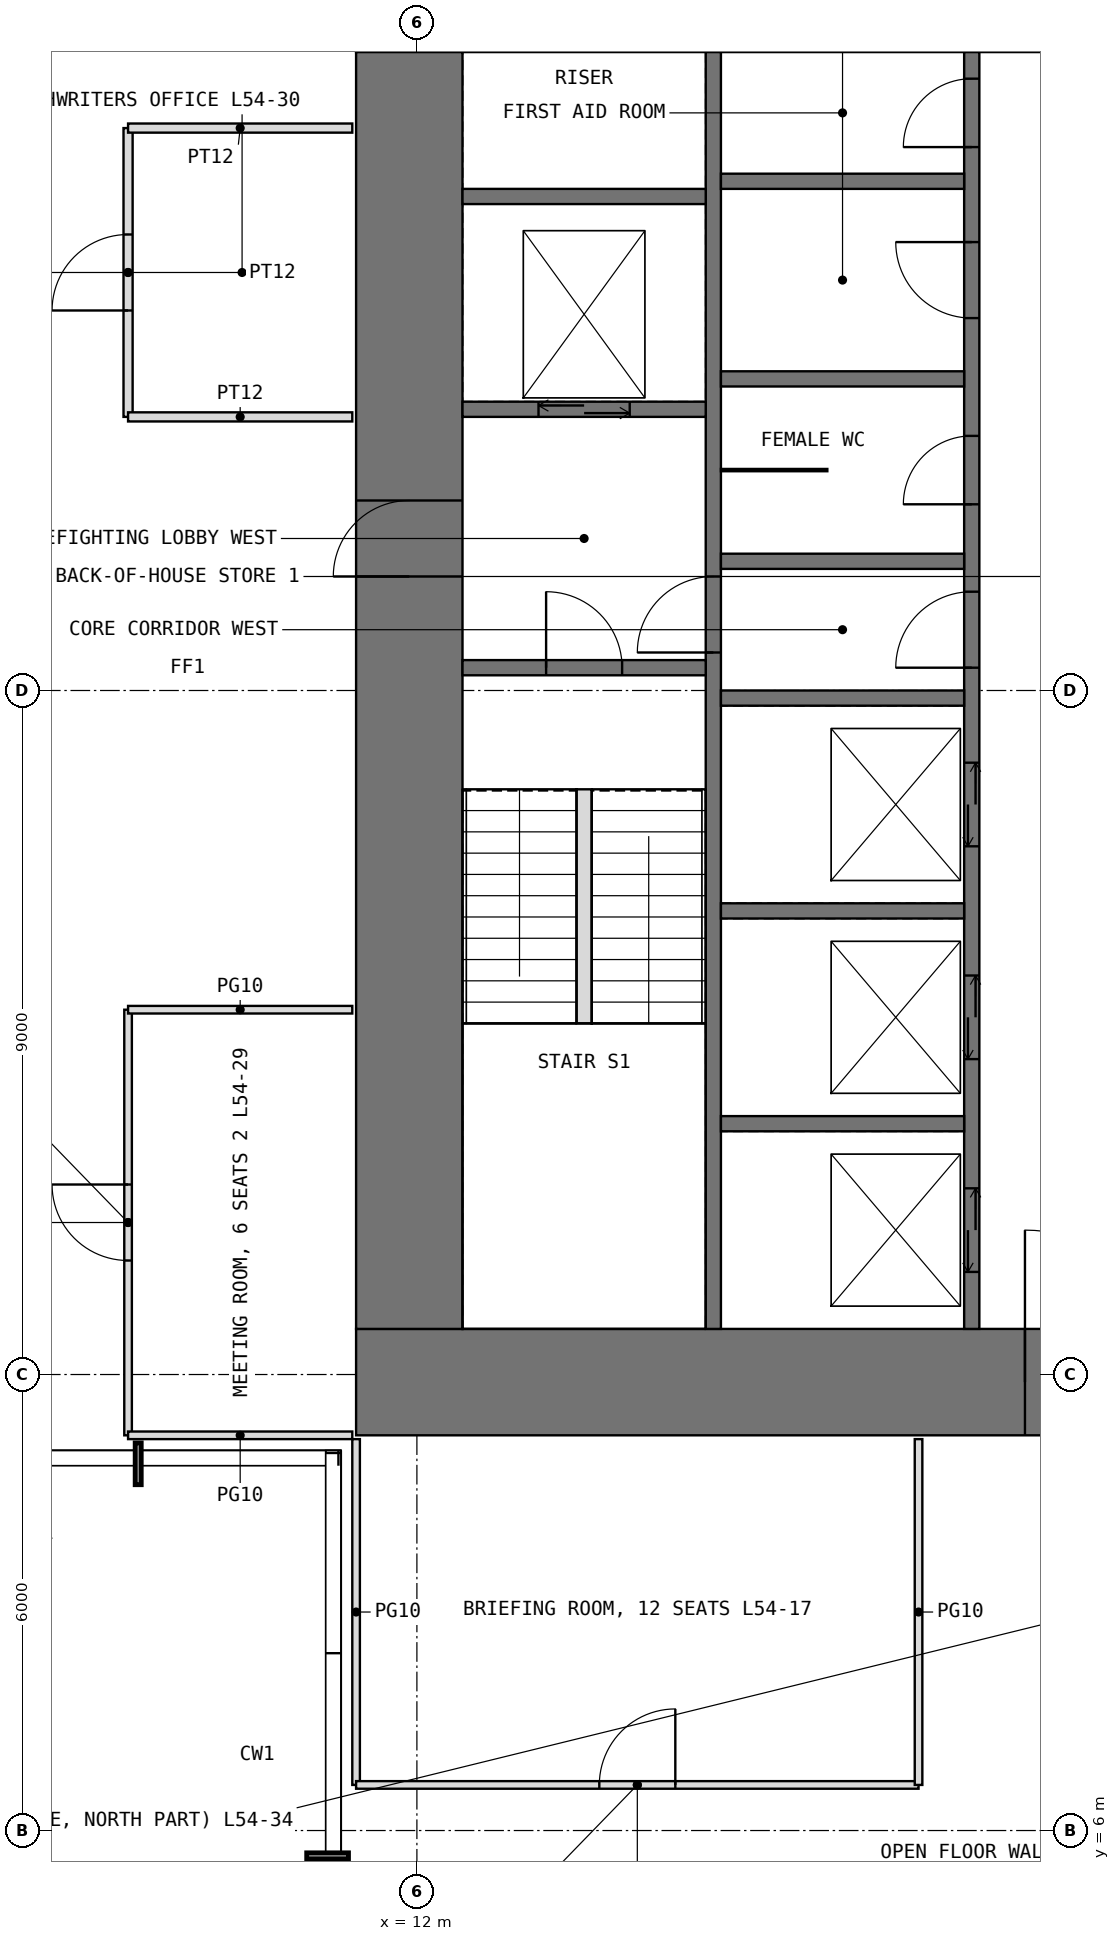
"""IFC4 building model, lengths in metres.
Left out: names, types, materials, properties, quantities, classifications, styles, units other than length and angle.
Written with IfcOpenShell. Run it as: python <this file> out.ifc"""

import sys

from ifc_helpers import new_model, si_unit, direction, frame, frame_2d, origin, place, context, subcontext, project, spatial, rectangle, extrude, element, fill, save


model = new_model("IFC4")
c1 = context("Model", 3, precision=1e-05, world=origin(), true_north=direction((0.0, 1.0)))
c2 = subcontext(c1, "Body", "Model", "MODEL_VIEW")
j1 = project(units=[si_unit("LENGTHUNIT", "METRE"), si_unit("PLANEANGLEUNIT", "RADIAN")], contexts=[c1])
p1 = place(None, origin())
s1 = spatial("IfcSite", under=j1, at=p1, CompositionType="ELEMENT")
p2 = place(p1, origin())
s2 = spatial("IfcBuilding", under=s1, at=p2, CompositionType="ELEMENT")
p3 = place(p2, frame((0.0, 0.0, 226.5)))
s3 = spatial("IfcBuildingStorey", under=s2, at=p3, CompositionType="ELEMENT", Elevation=226.5)
p4 = place(p3, frame((11.2, 11.9, -0.05), z_axis=(0.0, 0.0, 1.0), x_axis=(1.0, 0.0, 0.0)))
e1 = element("IfcWall", 1, at=p4, inside=s3, PredefinedType="SHEAR", context=c2, shape_type="SweptSolid", body=[
    extrude(rectangle(XDim=19.6, YDim=1.4, at=frame_2d((9.8, 0.0))), origin(), (0.0, 0.0, 1.0), 4.0),
])
p5 = place(p4, frame((8.8, 0.0, 0.05)))
e2 = element("IfcOpeningElement", 2, at=p5, cuts=e1, PredefinedType="OPENING", context=c2, shape_type="SweptSolid", body=[
    extrude(rectangle(XDim=2.0, YDim=2.2, at=frame_2d((1.0, 1.1))), frame((0.0, 0.71, 0.0), z_axis=(0.0, -1.0, 0.0), x_axis=(1.0, 0.0, 0.0)), (0.0, 0.0, 1.0), 1.42),
])
p6 = place(p3, frame((11.9, 12.6, -0.05), z_axis=(0.0, 0.0, 1.0), x_axis=(0.0, 1.0, 0.0)))
e3 = element("IfcWall", 3, at=p6, inside=s3, PredefinedType="SHEAR", context=c2, shape_type="SweptSolid", body=[
    extrude(rectangle(XDim=16.8, YDim=1.4, at=frame_2d((8.4, 0.0))), origin(), (0.0, 0.0, 1.0), 4.0),
])
p7 = place(p6, frame((9.9, 0.0, 0.05)))
e4 = element("IfcOpeningElement", 4, at=p7, cuts=e3, PredefinedType="OPENING", context=c2, shape_type="SweptSolid", body=[
    extrude(rectangle(XDim=1.0, YDim=2.2, at=frame_2d((0.5, 1.1))), frame((0.0, 0.71, 0.0), z_axis=(0.0, -1.0, 0.0), x_axis=(1.0, 0.0, 0.0)), (0.0, 0.0, 1.0), 1.42),
])
p8 = place(p3, frame((15.9, 12.6, -0.05), z_axis=(0.0, 0.0, 1.0), x_axis=(0.0, 1.0, 0.0)))
e5 = element("IfcWall", 5, at=p8, inside=s3, PredefinedType="SHEAR", context=c2, shape_type="SweptSolid", body=[
    extrude(rectangle(XDim=16.8, YDim=0.2, at=frame_2d((8.4, 0.0))), origin(), (0.0, 0.0, 1.0), 4.0),
])
p9 = place(p8, frame((8.9, 0.0, 0.05)))
e6 = element("IfcOpeningElement", 6, at=p9, cuts=e5, PredefinedType="OPENING", context=c2, shape_type="SweptSolid", body=[
    extrude(rectangle(XDim=1.0, YDim=2.2, at=frame_2d((0.5, 1.1))), frame((0.0, 0.11, 0.0), z_axis=(0.0, -1.0, 0.0), x_axis=(1.0, 0.0, 0.0)), (0.0, 0.0, 1.0), 0.22),
])
p10 = place(p3, frame((19.3, 12.6, -0.05), z_axis=(0.0, 0.0, 1.0), x_axis=(0.0, 1.0, 0.0)))
e7 = element("IfcWall", 7, at=p10, inside=s3, PredefinedType="SHEAR", context=c2, shape_type="SweptSolid", body=[
    extrude(rectangle(XDim=16.8, YDim=0.2, at=frame_2d((8.4, 0.0))), origin(), (0.0, 0.0, 1.0), 4.0),
])
p11 = place(p10, frame((8.7, 0.0, 0.05)))
e8 = element("IfcOpeningElement", 8, at=p11, cuts=e7, PredefinedType="OPENING", context=c2, shape_type="SweptSolid", body=[
    extrude(rectangle(XDim=1.0, YDim=2.2, at=frame_2d((0.5, 1.1))), frame((0.0, 0.11, 0.0), z_axis=(0.0, -1.0, 0.0), x_axis=(1.0, 0.0, 0.0)), (0.0, 0.0, 1.0), 0.22),
])
p12 = place(p10, frame((10.85, 0.0, 0.05)))
e9 = element("IfcOpeningElement", 9, at=p12, cuts=e7, PredefinedType="OPENING", context=c2, shape_type="SweptSolid", body=[
    extrude(rectangle(XDim=0.9, YDim=2.2, at=frame_2d((0.45, 1.1))), frame((0.0, 0.11, 0.0), z_axis=(0.0, -1.0, 0.0), x_axis=(1.0, 0.0, 0.0)), (0.0, 0.0, 1.0), 0.22),
])
p13 = place(p10, frame((13.3, 0.0, 0.05)))
e10 = element("IfcOpeningElement", 10, at=p13, cuts=e7, PredefinedType="OPENING", context=c2, shape_type="SweptSolid", body=[
    extrude(rectangle(XDim=1.0, YDim=2.2, at=frame_2d((0.5, 1.1))), frame((0.0, 0.11, 0.0), z_axis=(0.0, -1.0, 0.0), x_axis=(1.0, 0.0, 0.0)), (0.0, 0.0, 1.0), 0.22),
])
p14 = place(p10, frame((15.55, 0.0, 0.05)))
e11 = element("IfcOpeningElement", 11, at=p14, cuts=e7, PredefinedType="OPENING", context=c2, shape_type="SweptSolid", body=[
    extrude(rectangle(XDim=0.9, YDim=2.2, at=frame_2d((0.45, 1.1))), frame((0.0, 0.11, 0.0), z_axis=(0.0, -1.0, 0.0), x_axis=(1.0, 0.0, 0.0)), (0.0, 0.0, 1.0), 0.22),
])
p15 = place(p10, frame((0.75, 0.0, 0.05)))
e12 = element("IfcOpeningElement", 12, at=p15, cuts=e7, PredefinedType="OPENING", context=c2, shape_type="SweptSolid", body=[
    extrude(rectangle(XDim=1.1, YDim=2.2, at=frame_2d((0.55, 1.1))), frame((0.0, 0.11, 0.0), z_axis=(0.0, -1.0, 0.0), x_axis=(1.0, 0.0, 0.0)), (0.0, 0.0, 1.0), 0.22),
])
p16 = place(p10, frame((3.55, 0.0, 0.05)))
e13 = element("IfcOpeningElement", 13, at=p16, cuts=e7, PredefinedType="OPENING", context=c2, shape_type="SweptSolid", body=[
    extrude(rectangle(XDim=1.1, YDim=2.2, at=frame_2d((0.55, 1.1))), frame((0.0, 0.11, 0.0), z_axis=(0.0, -1.0, 0.0), x_axis=(1.0, 0.0, 0.0)), (0.0, 0.0, 1.0), 0.22),
])
p17 = place(p10, frame((6.35, 0.0, 0.05)))
e14 = element("IfcOpeningElement", 14, at=p17, cuts=e7, PredefinedType="OPENING", context=c2, shape_type="SweptSolid", body=[
    extrude(rectangle(XDim=1.1, YDim=2.2, at=frame_2d((0.55, 1.1))), frame((0.0, 0.11, 0.0), z_axis=(0.0, -1.0, 0.0), x_axis=(1.0, 0.0, 0.0)), (0.0, 0.0, 1.0), 0.22),
])
p18 = place(p3, frame((12.6, 21.3, -0.05), z_axis=(0.0, 0.0, 1.0), x_axis=(1.0, 0.0, 0.0)))
e15 = element("IfcWall", 15, at=p18, inside=s3, PredefinedType="SHEAR", context=c2, shape_type="SweptSolid", body=[
    extrude(rectangle(XDim=3.2, YDim=0.2, at=frame_2d((1.6, 0.0))), origin(), (0.0, 0.0, 1.0), 4.0),
])
p19 = place(p18, frame((1.1, 0.0, 0.05)))
e16 = element("IfcOpeningElement", 16, at=p19, cuts=e15, PredefinedType="OPENING", context=c2, shape_type="SweptSolid", body=[
    extrude(rectangle(XDim=1.0, YDim=2.2, at=frame_2d((0.5, 1.1))), frame((0.0, 0.11, 0.0), z_axis=(0.0, -1.0, 0.0), x_axis=(1.0, 0.0, 0.0)), (0.0, 0.0, 1.0), 0.22),
])
p20 = place(p3, frame((12.6, 24.7, -0.05), z_axis=(0.0, 0.0, 1.0), x_axis=(1.0, 0.0, 0.0)))
e17 = element("IfcWall", 17, at=p20, inside=s3, PredefinedType="SHEAR", context=c2, shape_type="SweptSolid", body=[
    extrude(rectangle(XDim=3.2, YDim=0.2, at=frame_2d((1.6, 0.0))), origin(), (0.0, 0.0, 1.0), 4.0),
])
p21 = place(p20, frame((1.0, 0.0, 0.05)))
e18 = element("IfcOpeningElement", 18, at=p21, cuts=e17, PredefinedType="OPENING", context=c2, shape_type="SweptSolid", body=[
    extrude(rectangle(XDim=1.2, YDim=2.2, at=frame_2d((0.6, 1.1))), frame((0.0, 0.11, 0.0), z_axis=(0.0, -1.0, 0.0), x_axis=(1.0, 0.0, 0.0)), (0.0, 0.0, 1.0), 0.22),
])
for number, where, z_axis, x_axis in (
    (19, (12.6, 27.5, -0.05), (0.0, 0.0, 1.0), (1.0, 0.0, 0.0)),
    (20, (16.0, 15.3, -0.05), (0.0, 0.0, 1.0), (1.0, 0.0, 0.0)),
    (21, (16.0, 18.1, -0.05), (0.0, 0.0, 1.0), (1.0, 0.0, 0.0)),
    (22, (16.0, 20.9, -0.05), (0.0, 0.0, 1.0), (1.0, 0.0, 0.0)),
    (23, (16.0, 22.7, -0.05), (0.0, 0.0, 1.0), (1.0, 0.0, 0.0)),
    (24, (16.0, 25.1, -0.05), (0.0, 0.0, 1.0), (1.0, 0.0, 0.0)),
    (25, (16.0, 27.7, -0.05), (0.0, 0.0, 1.0), (1.0, 0.0, 0.0)),
):
    element("IfcWall", number, at=place(p3, frame(where, z_axis=z_axis, x_axis=x_axis)), inside=s3, PredefinedType="SHEAR", context=c2, shape_type="SweptSolid", body=[
        extrude(rectangle(XDim=3.2, YDim=0.2, at=frame_2d((1.6, 0.0))), origin(), (0.0, 0.0, 1.0), 4.0),
    ])
p22 = place(p3, frame((16.0, 23.9, 0.0), z_axis=(0.0, 0.0, 1.0), x_axis=(1.0, 0.0, 0.0)))
e26 = element("IfcWall", 26, at=p22, inside=s3, PredefinedType="PARTITIONING", context=c2, shape_type="SweptSolid", body=[
    extrude(rectangle(XDim=1.4, YDim=0.03, at=frame_2d((0.7, 0.0))), origin(), (0.0, 0.0, 1.0), 3.75),
])
p23 = place(p3, frame((8.2, 11.2, 0.0), z_axis=(0.0, 0.0, 1.0), x_axis=(0.0, 1.0, 0.0)))
e27 = element("IfcWall", 27, at=p23, inside=s3, PredefinedType="PARTITIONING", context=c2, shape_type="SweptSolid", body=[
    extrude(rectangle(XDim=5.6, YDim=0.1, at=frame_2d((2.8, 0.0))), origin(), (0.0, 0.0, 1.0), 3.75),
])
p24 = place(p23, frame((2.3, 0.0, 0.0)))
e28 = element("IfcOpeningElement", 28, at=p24, cuts=e27, PredefinedType="OPENING", context=c2, shape_type="SweptSolid", body=[
    extrude(rectangle(XDim=1.0, YDim=2.4, at=frame_2d((0.5, 1.2))), frame((0.0, 0.06, 0.0), z_axis=(0.0, -1.0, 0.0), x_axis=(1.0, 0.0, 0.0)), (0.0, 0.0, 1.0), 0.12),
])
for number, where, z_axis, x_axis in (
    (29, (8.2, 11.2, 0.0), (0.0, 0.0, 1.0), (1.0, 0.0, 0.0)),
    (30, (8.2, 16.8, 0.0), (0.0, 0.0, 1.0), (1.0, 0.0, 0.0)),
):
    element("IfcWall", number, at=place(p3, frame(where, z_axis=z_axis, x_axis=x_axis)), inside=s3, PredefinedType="PARTITIONING", context=c2, shape_type="SweptSolid", body=[
        extrude(rectangle(XDim=2.95, YDim=0.1, at=frame_2d((1.475, 0.0))), origin(), (0.0, 0.0, 1.0), 3.75),
    ])
p25 = place(p3, frame((8.2, 24.6, 0.0), z_axis=(0.0, 0.0, 1.0), x_axis=(0.0, 1.0, 0.0)))
e31 = element("IfcWall", 31, at=p25, inside=s3, PredefinedType="PARTITIONING", context=c2, shape_type="SweptSolid", body=[
    extrude(rectangle(XDim=3.8, YDim=0.12, at=frame_2d((1.9, 0.0))), origin(), (0.0, 0.0, 1.0), 3.75),
])
p26 = place(p25, frame((1.4, 0.0, 0.0)))
e32 = element("IfcOpeningElement", 32, at=p26, cuts=e31, PredefinedType="OPENING", context=c2, shape_type="SweptSolid", body=[
    extrude(rectangle(XDim=1.0, YDim=2.2, at=frame_2d((0.5, 1.1))), frame((0.0, 0.07, 0.0), z_axis=(0.0, -1.0, 0.0), x_axis=(1.0, 0.0, 0.0)), (0.0, 0.0, 1.0), 0.14),
])
for number, where, z_axis, x_axis in (
    (33, (8.2, 24.6, 0.0), (0.0, 0.0, 1.0), (1.0, 0.0, 0.0)),
    (34, (8.2, 28.4, 0.0), (0.0, 0.0, 1.0), (1.0, 0.0, 0.0)),
):
    element("IfcWall", number, at=place(p3, frame(where, z_axis=z_axis, x_axis=x_axis)), inside=s3, PredefinedType="PARTITIONING", context=c2, shape_type="SweptSolid", body=[
        extrude(rectangle(XDim=2.95, YDim=0.12, at=frame_2d((1.475, 0.0))), origin(), (0.0, 0.0, 1.0), 3.75),
    ])
p27 = place(p3, frame((11.2, 6.6, 0.0), z_axis=(0.0, 0.0, 1.0), x_axis=(0.0, 1.0, 0.0)))
e35 = element("IfcWall", 35, at=p27, inside=s3, PredefinedType="PARTITIONING", context=c2, shape_type="SweptSolid", body=[
    extrude(rectangle(XDim=4.55, YDim=0.1, at=frame_2d((2.275, 0.0))), origin(), (0.0, 0.0, 1.0), 3.75),
])
p28 = place(p3, frame((11.2, 6.6, 0.0), z_axis=(0.0, 0.0, 1.0), x_axis=(1.0, 0.0, 0.0)))
e36 = element("IfcWall", 36, at=p28, inside=s3, PredefinedType="PARTITIONING", context=c2, shape_type="SweptSolid", body=[
    extrude(rectangle(XDim=7.4, YDim=0.1, at=frame_2d((3.7, 0.0))), origin(), (0.0, 0.0, 1.0), 3.75),
])
p29 = place(p28, frame((3.2, 0.0, 0.0)))
e37 = element("IfcOpeningElement", 37, at=p29, cuts=e36, PredefinedType="OPENING", context=c2, shape_type="SweptSolid", body=[
    extrude(rectangle(XDim=1.0, YDim=2.4, at=frame_2d((0.5, 1.2))), frame((0.0, 0.06, 0.0), z_axis=(0.0, -1.0, 0.0), x_axis=(1.0, 0.0, 0.0)), (0.0, 0.0, 1.0), 0.12),
])
p30 = place(p3, frame((18.6, 6.6, 0.0), z_axis=(0.0, 0.0, 1.0), x_axis=(0.0, 1.0, 0.0)))
e38 = element("IfcWall", 38, at=p30, inside=s3, PredefinedType="PARTITIONING", context=c2, shape_type="SweptSolid", body=[
    extrude(rectangle(XDim=4.55, YDim=0.1, at=frame_2d((2.275, 0.0))), origin(), (0.0, 0.0, 1.0), 3.75),
])
p31 = place(p3, frame((14.2, 16.62, 0.0), z_axis=(0.0, 0.0, 1.0), x_axis=(0.0, 1.0, 0.0)))
e39 = element("IfcWall", 39, at=p31, inside=s3, PredefinedType="PARTITIONING", context=c2, shape_type="SweptSolid", body=[
    extrude(rectangle(XDim=3.08, YDim=0.2, at=frame_2d((1.54, 0.0))), origin(), (0.0, 0.0, 1.0), 4.0),
])
p32 = place(p5, origin())
e40 = element("IfcDoor", 40, at=p32, inside=s3, OperationType="DOUBLE_DOOR_SINGLE_SWING", PredefinedType="DOOR", context=c2, shape_type="SweptSolid", body=[
    extrude(rectangle(XDim=2.0, YDim=2.2, at=frame_2d((1.0, 1.1))), frame((0.0, 0.025, 0.0), z_axis=(0.0, -1.0, 0.0), x_axis=(1.0, 0.0, 0.0)), (0.0, 0.0, 1.0), 0.05),
])
fill(e2, e40)
p33 = place(p7, origin())
e41 = element("IfcDoor", 41, at=p33, inside=s3, OperationType="SINGLE_SWING_LEFT", PredefinedType="DOOR", context=c2, shape_type="SweptSolid", body=[
    extrude(rectangle(XDim=1.0, YDim=2.2, at=frame_2d((0.5, 1.1))), frame((0.0, 0.025, 0.0), z_axis=(0.0, -1.0, 0.0), x_axis=(1.0, 0.0, 0.0)), (0.0, 0.0, 1.0), 0.05),
])
fill(e4, e41)
p34 = place(p19, origin())
e42 = element("IfcDoor", 42, at=p34, inside=s3, OperationType="SINGLE_SWING_LEFT", PredefinedType="DOOR", context=c2, shape_type="SweptSolid", body=[
    extrude(rectangle(XDim=1.0, YDim=2.2, at=frame_2d((0.5, 1.1))), frame((0.0, 0.025, 0.0), z_axis=(0.0, -1.0, 0.0), x_axis=(1.0, 0.0, 0.0)), (0.0, 0.0, 1.0), 0.05),
])
fill(e16, e42)
p35 = place(p9, origin())
e43 = element("IfcDoor", 43, at=p35, inside=s3, OperationType="SINGLE_SWING_LEFT", PredefinedType="DOOR", context=c2, shape_type="SweptSolid", body=[
    extrude(rectangle(XDim=1.0, YDim=2.2, at=frame_2d((0.5, 1.1))), frame((0.0, 0.025, 0.0), z_axis=(0.0, -1.0, 0.0), x_axis=(1.0, 0.0, 0.0)), (0.0, 0.0, 1.0), 0.05),
])
fill(e6, e43)
p36 = place(p11, origin())
e44 = element("IfcDoor", 44, at=p36, inside=s3, OperationType="SINGLE_SWING_LEFT", PredefinedType="DOOR", context=c2, shape_type="SweptSolid", body=[
    extrude(rectangle(XDim=1.0, YDim=2.2, at=frame_2d((0.5, 1.1))), frame((0.0, 0.025, 0.0), z_axis=(0.0, -1.0, 0.0), x_axis=(1.0, 0.0, 0.0)), (0.0, 0.0, 1.0), 0.05),
])
fill(e8, e44)
p37 = place(p12, origin())
e45 = element("IfcDoor", 45, at=p37, inside=s3, OperationType="SINGLE_SWING_LEFT", PredefinedType="DOOR", context=c2, shape_type="SweptSolid", body=[
    extrude(rectangle(XDim=0.9, YDim=2.2, at=frame_2d((0.45, 1.1))), frame((0.0, 0.025, 0.0), z_axis=(0.0, -1.0, 0.0), x_axis=(1.0, 0.0, 0.0)), (0.0, 0.0, 1.0), 0.05),
])
fill(e9, e45)
p38 = place(p13, origin())
e46 = element("IfcDoor", 46, at=p38, inside=s3, OperationType="SINGLE_SWING_RIGHT", PredefinedType="DOOR", context=c2, shape_type="SweptSolid", body=[
    extrude(rectangle(XDim=1.0, YDim=2.2, at=frame_2d((0.5, 1.1))), frame((0.0, 0.025, 0.0), z_axis=(0.0, -1.0, 0.0), x_axis=(1.0, 0.0, 0.0)), (0.0, 0.0, 1.0), 0.05),
])
fill(e10, e46)
p39 = place(p14, origin())
e47 = element("IfcDoor", 47, at=p39, inside=s3, OperationType="SINGLE_SWING_LEFT", PredefinedType="DOOR", context=c2, shape_type="SweptSolid", body=[
    extrude(rectangle(XDim=0.9, YDim=2.2, at=frame_2d((0.45, 1.1))), frame((0.0, 0.025, 0.0), z_axis=(0.0, -1.0, 0.0), x_axis=(1.0, 0.0, 0.0)), (0.0, 0.0, 1.0), 0.05),
])
fill(e11, e47)
p40 = place(p29, origin())
e48 = element("IfcDoor", 48, at=p40, inside=s3, OperationType="SINGLE_SWING_RIGHT", PredefinedType="DOOR", context=c2, shape_type="SweptSolid", body=[
    extrude(rectangle(XDim=1.0, YDim=2.4, at=frame_2d((0.5, 1.2))), frame((0.0, 0.025, 0.0), z_axis=(0.0, -1.0, 0.0), x_axis=(1.0, 0.0, 0.0)), (0.0, 0.0, 1.0), 0.05),
])
fill(e37, e48)
p41 = place(p24, origin())
e49 = element("IfcDoor", 49, at=p41, inside=s3, OperationType="SINGLE_SWING_RIGHT", PredefinedType="DOOR", context=c2, shape_type="SweptSolid", body=[
    extrude(rectangle(XDim=1.0, YDim=2.4, at=frame_2d((0.5, 1.2))), frame((0.0, 0.025, 0.0), z_axis=(0.0, -1.0, 0.0), x_axis=(1.0, 0.0, 0.0)), (0.0, 0.0, 1.0), 0.05),
])
fill(e28, e49)
p42 = place(p26, origin())
e50 = element("IfcDoor", 50, at=p42, inside=s3, OperationType="SINGLE_SWING_LEFT", PredefinedType="DOOR", context=c2, shape_type="SweptSolid", body=[
    extrude(rectangle(XDim=1.0, YDim=2.2, at=frame_2d((0.5, 1.1))), frame((0.0, 0.025, 0.0), z_axis=(0.0, -1.0, 0.0), x_axis=(1.0, 0.0, 0.0)), (0.0, 0.0, 1.0), 0.05),
])
fill(e32, e50)
p43 = place(p15, origin())
e51 = element("IfcDoor", 51, at=p43, inside=s3, OperationType="DOUBLE_DOOR_SLIDING", PredefinedType="DOOR", context=c2, shape_type="SweptSolid", body=[
    extrude(rectangle(XDim=1.1, YDim=2.2, at=frame_2d((0.55, 1.1))), frame((0.0, 0.025, 0.0), z_axis=(0.0, -1.0, 0.0), x_axis=(1.0, 0.0, 0.0)), (0.0, 0.0, 1.0), 0.05),
])
fill(e12, e51)
p44 = place(p16, origin())
e52 = element("IfcDoor", 52, at=p44, inside=s3, OperationType="DOUBLE_DOOR_SLIDING", PredefinedType="DOOR", context=c2, shape_type="SweptSolid", body=[
    extrude(rectangle(XDim=1.1, YDim=2.2, at=frame_2d((0.55, 1.1))), frame((0.0, 0.025, 0.0), z_axis=(0.0, -1.0, 0.0), x_axis=(1.0, 0.0, 0.0)), (0.0, 0.0, 1.0), 0.05),
])
fill(e13, e52)
p45 = place(p17, origin())
e53 = element("IfcDoor", 53, at=p45, inside=s3, OperationType="DOUBLE_DOOR_SLIDING", PredefinedType="DOOR", context=c2, shape_type="SweptSolid", body=[
    extrude(rectangle(XDim=1.1, YDim=2.2, at=frame_2d((0.55, 1.1))), frame((0.0, 0.025, 0.0), z_axis=(0.0, -1.0, 0.0), x_axis=(1.0, 0.0, 0.0)), (0.0, 0.0, 1.0), 0.05),
])
fill(e14, e53)
p46 = place(p21, origin())
e54 = element("IfcDoor", 54, at=p46, inside=s3, OperationType="DOUBLE_DOOR_SLIDING", PredefinedType="DOOR", context=c2, shape_type="SweptSolid", body=[
    extrude(rectangle(XDim=1.2, YDim=2.2, at=frame_2d((0.6, 1.1))), frame((0.0, 0.025, 0.0), z_axis=(0.0, -1.0, 0.0), x_axis=(1.0, 0.0, 0.0)), (0.0, 0.0, 1.0), 0.05),
])
fill(e18, e54)
save(model, sys.argv[1])
